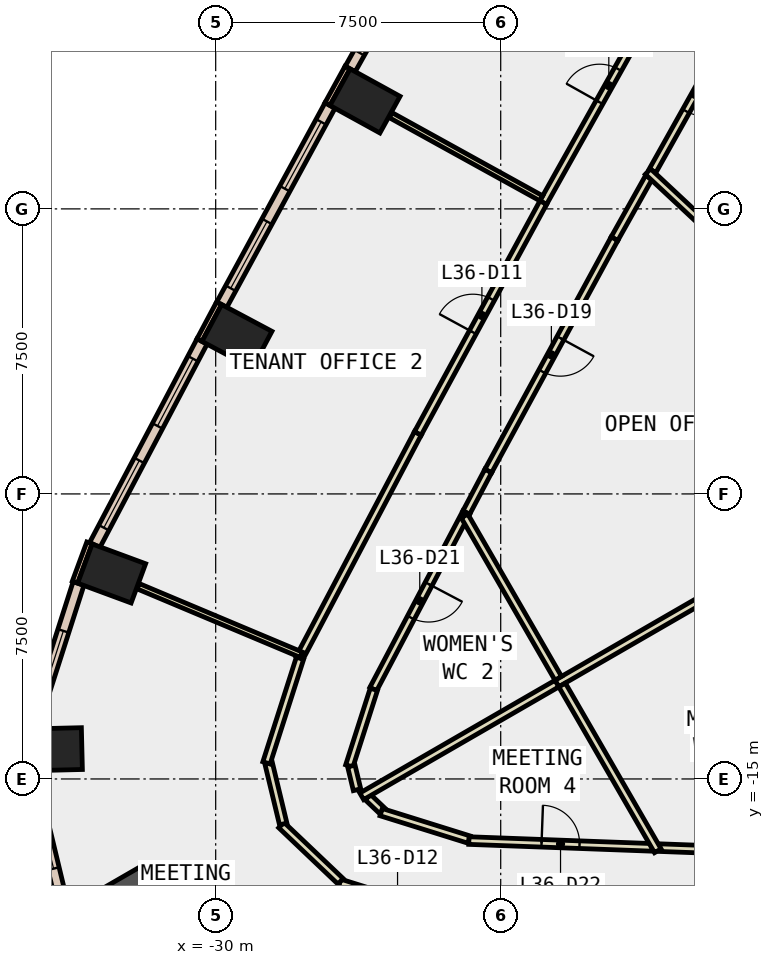
"""IFC4 building model, lengths in metres.
Left out: names, types, materials, properties, quantities, classifications, styles, units other than length and angle.
Written with IfcOpenShell. Run it as: python <this file> out.ifc"""

import sys

from ifc_helpers import new_model, si_unit, direction, frame, frame_2d, origin, origin_2d, place, context, subcontext, project, spatial, rectangle, extrude, element, fill, save


model = new_model("IFC4")
c1 = context("Model", 3, precision=1e-05, world=origin(), true_north=direction((0.0, 1.0)))
c2 = subcontext(c1, "Body", "Model", "MODEL_VIEW")
j1 = project(units=[si_unit("LENGTHUNIT", "METRE"), si_unit("PLANEANGLEUNIT", "RADIAN")], contexts=[c1])
p1 = place(None, origin())
s1 = spatial("IfcSite", under=j1, at=p1, CompositionType="ELEMENT")
p2 = place(p1, origin())
s2 = spatial("IfcBuilding", under=s1, at=p2, CompositionType="ELEMENT")
p3 = place(p2, frame((0.0, 0.0, 163.4)))
s3 = spatial("IfcBuildingStorey", under=s2, at=p3, CompositionType="ELEMENT", Elevation=163.4)
for number, where, z_axis, x_axis in (
    (1, (-26.071, 2.841, -0.4), (0.0, 0.0, 1.0), (0.482, 0.876, 0.0)),
    (2, (-29.44, -3.355, -0.4), (0.0, 0.0, 1.0), (0.47, 0.883, 0.0)),
    (3, (-32.738, -9.593, -0.4), (0.0, 0.0, 1.0), (0.347, 0.938, 0.0)),
    (4, (-34.271, -14.219, -0.4), (0.0, 0.0, 1.0), (-0.024, 1.0, 0.0)),
):
    element("IfcColumn", number, at=place(p3, frame(where, z_axis=z_axis, x_axis=x_axis)), inside=s3, PredefinedType="COLUMN", context=c2, shape_type="SweptSolid", body=[
        extrude(rectangle(XDim=1.1, YDim=1.5, at=origin_2d()), origin(), (0.0, 0.0, 1.0), 4.2),
    ])
p4 = place(p3, frame((-32.244, -18.615, -0.4), z_axis=(0.0, 0.0, 1.0), x_axis=(0.866025403784, 0.5, 0.0)))
e5 = element("IfcColumn", 5, at=p4, inside=s3, PredefinedType="COLUMN", context=c2, shape_type="SweptSolid", body=[
    extrude(rectangle(XDim=2.0, YDim=2.0, at=origin_2d()), origin(), (0.0, 0.0, 1.0), 4.2),
])
for number, where, z_axis, x_axis in (
    (6, (-26.529, 3.721, 0.0), (0.0, 0.0, 1.0), (-0.482, -0.876, 0.0)),
    (7, (-29.909, -2.482, 0.0), (0.0, 0.0, 1.0), (-0.47, -0.883, 0.0)),
    (8, (-33.321, -8.791, 0.0), (0.0, 0.0, 1.0), (-0.346, -0.938, 0.0)),
):
    element("IfcWall", number, at=place(p3, frame(where, z_axis=z_axis, x_axis=x_axis)), inside=s3, PredefinedType="STANDARD", context=c2, shape_type="SweptSolid", body=[
        extrude(rectangle(XDim=1.1, YDim=0.15, at=frame_2d((0.55, 0.0))), origin(), (0.0, 0.0, 1.0), 3.8),
    ])
p5 = place(p3, frame((-23.544, 8.883, 0.0), z_axis=(0.0, 0.0, 1.0), x_axis=(-0.489032196971, -0.87226573378, 0.0)))
e9 = element("IfcWall", 9, at=p5, inside=s3, PredefinedType="STANDARD", context=c2, shape_type="SweptSolid", body=[
    extrude(rectangle(XDim=5.963, YDim=0.3, at=frame_2d((2.981, 0.0))), origin(), (0.0, 0.0, 1.0), 3.8),
])
p6 = place(p5, frame((0.491, 0.0, 0.9)))
e10 = element("IfcOpeningElement", 10, at=p6, cuts=e9, PredefinedType="OPENING", context=c2, shape_type="SweptSolid", body=[
    extrude(rectangle(XDim=2.0, YDim=2.6, at=frame_2d((1.0, 1.3))), frame((0.0, 0.16, 0.0), z_axis=(0.0, -1.0, 0.0), x_axis=(1.0, 0.0, 0.0)), (0.0, 0.0, 1.0), 0.32),
])
p7 = place(p5, frame((3.472, 0.0, 0.9)))
e11 = element("IfcOpeningElement", 11, at=p7, cuts=e9, PredefinedType="OPENING", context=c2, shape_type="SweptSolid", body=[
    extrude(rectangle(XDim=2.0, YDim=2.6, at=frame_2d((1.0, 1.3))), frame((0.0, 0.16, 0.0), z_axis=(0.0, -1.0, 0.0), x_axis=(1.0, 0.0, 0.0)), (0.0, 0.0, 1.0), 0.32),
])
p8 = place(p3, frame((-26.991, 2.72, 0.0), z_axis=(0.0, 0.0, 1.0), x_axis=(-0.477555226268, -0.878601733361, 0.0)))
e12 = element("IfcWall", 12, at=p8, inside=s3, PredefinedType="STANDARD", context=c2, shape_type="SweptSolid", body=[
    extrude(rectangle(XDim=5.964, YDim=0.3, at=frame_2d((2.982, 0.0))), origin(), (0.0, 0.0, 1.0), 3.8),
])
p9 = place(p8, frame((0.491, 0.0, 0.9)))
e13 = element("IfcOpeningElement", 13, at=p9, cuts=e12, PredefinedType="OPENING", context=c2, shape_type="SweptSolid", body=[
    extrude(rectangle(XDim=2.0, YDim=2.6, at=frame_2d((1.0, 1.3))), frame((0.0, 0.16, 0.0), z_axis=(0.0, -1.0, 0.0), x_axis=(1.0, 0.0, 0.0)), (0.0, 0.0, 1.0), 0.32),
])
p10 = place(p8, frame((3.473, 0.0, 0.9)))
e14 = element("IfcOpeningElement", 14, at=p10, cuts=e12, PredefinedType="OPENING", context=c2, shape_type="SweptSolid", body=[
    extrude(rectangle(XDim=2.0, YDim=2.6, at=frame_2d((1.0, 1.3))), frame((0.0, 0.16, 0.0), z_axis=(0.0, -1.0, 0.0), x_axis=(1.0, 0.0, 0.0)), (0.0, 0.0, 1.0), 0.32),
])
p11 = place(p3, frame((-30.358, -3.488, 0.0), z_axis=(0.0, 0.0, 1.0), x_axis=(-0.466399410196, -0.884574242316, 0.0)))
e15 = element("IfcWall", 15, at=p11, inside=s3, PredefinedType="STANDARD", context=c2, shape_type="SweptSolid", body=[
    extrude(rectangle(XDim=6.055, YDim=0.3, at=frame_2d((3.027, 0.0))), origin(), (0.0, 0.0, 1.0), 3.8),
])
p12 = place(p11, frame((0.514, 0.0, 0.9)))
e16 = element("IfcOpeningElement", 16, at=p12, cuts=e15, PredefinedType="OPENING", context=c2, shape_type="SweptSolid", body=[
    extrude(rectangle(XDim=2.0, YDim=2.6, at=frame_2d((1.0, 1.3))), frame((0.0, 0.16, 0.0), z_axis=(0.0, -1.0, 0.0), x_axis=(1.0, 0.0, 0.0)), (0.0, 0.0, 1.0), 0.32),
])
p13 = place(p11, frame((3.541, 0.0, 0.9)))
e17 = element("IfcOpeningElement", 17, at=p13, cuts=e15, PredefinedType="OPENING", context=c2, shape_type="SweptSolid", body=[
    extrude(rectangle(XDim=2.0, YDim=2.6, at=frame_2d((1.0, 1.3))), frame((0.0, 0.16, 0.0), z_axis=(0.0, -1.0, 0.0), x_axis=(1.0, 0.0, 0.0)), (0.0, 0.0, 1.0), 0.32),
])
p14 = place(p3, frame((-33.609, -9.856, 0.0), z_axis=(0.0, 0.0, 1.0), x_axis=(-0.305018133869, -0.952346543025, 0.0)))
e18 = element("IfcWall", 18, at=p14, inside=s3, PredefinedType="STANDARD", context=c2, shape_type="SweptSolid", body=[
    extrude(rectangle(XDim=4.02, YDim=0.3, at=frame_2d((2.01, 0.0))), origin(), (0.0, 0.0, 1.0), 3.8),
])
p15 = place(p14, frame((1.31, 0.0, 0.9)))
e19 = element("IfcOpeningElement", 19, at=p15, cuts=e18, PredefinedType="OPENING", context=c2, shape_type="SweptSolid", body=[
    extrude(rectangle(XDim=1.4, YDim=2.6, at=frame_2d((0.7, 1.3))), frame((0.0, 0.16, 0.0), z_axis=(0.0, -1.0, 0.0), x_axis=(1.0, 0.0, 0.0)), (0.0, 0.0, 1.0), 0.32),
])
p16 = place(p3, frame((-34.886, -14.783, 0.0), z_axis=(0.0, 0.0, 1.0), x_axis=(0.234102046927, -0.972212030179, 0.0)))
e20 = element("IfcWall", 20, at=p16, inside=s3, PredefinedType="STANDARD", context=c2, shape_type="SweptSolid", body=[
    extrude(rectangle(XDim=3.9, YDim=0.3, at=frame_2d((1.95, 0.0))), origin(), (0.0, 0.0, 1.0), 3.8),
])
p17 = place(p16, frame((1.25, 0.0, 0.9)))
e21 = element("IfcOpeningElement", 21, at=p17, cuts=e20, PredefinedType="OPENING", context=c2, shape_type="SweptSolid", body=[
    extrude(rectangle(XDim=1.4, YDim=2.6, at=frame_2d((0.7, 1.3))), frame((0.0, 0.16, 0.0), z_axis=(0.0, -1.0, 0.0), x_axis=(1.0, 0.0, 0.0)), (0.0, 0.0, 1.0), 0.32),
])
p18 = place(p3, frame((-16.255, 5.014, 0.0), z_axis=(0.0, 0.0, 1.0), x_axis=(-0.488988017817, -0.87229050117, 0.0)))
e22 = element("IfcWall", 22, at=p18, inside=s3, PredefinedType="PARTITIONING", context=c2, shape_type="SweptSolid", body=[
    extrude(rectangle(XDim=4.599, YDim=0.2, at=frame_2d((2.3, 0.0))), origin(), (0.0, 0.0, 1.0), 3.8),
])
p19 = place(p18, frame((1.8, 0.0, 0.0)))
e23 = element("IfcOpeningElement", 23, at=p19, cuts=e22, PredefinedType="OPENING", context=c2, shape_type="SweptSolid", body=[
    extrude(rectangle(XDim=1.0, YDim=2.1, at=frame_2d((0.5, 1.05))), frame((0.0, 0.11, 0.0), z_axis=(0.0, -1.0, 0.0), x_axis=(1.0, 0.0, 0.0)), (0.0, 0.0, 1.0), 0.22),
])
p20 = place(p3, frame((-18.602, 0.828, 0.0), z_axis=(0.0, 0.0, 1.0), x_axis=(-0.488969229043, -0.872301033502, 0.0)))
e24 = element("IfcWall", 24, at=p20, inside=s3, PredefinedType="PARTITIONING", context=c2, shape_type="SweptSolid", body=[
    extrude(rectangle(XDim=1.849, YDim=0.2, at=frame_2d((0.924, 0.0))), origin(), (0.0, 0.0, 1.0), 3.8),
])
p21 = place(p3, frame((-19.506, -0.785, 0.0), z_axis=(0.0, 0.0, 1.0), x_axis=(-0.477513909405, -0.878624189472, 0.0)))
e25 = element("IfcWall", 25, at=p21, inside=s3, PredefinedType="PARTITIONING", context=c2, shape_type="SweptSolid", body=[
    extrude(rectangle(XDim=6.956, YDim=0.2, at=frame_2d((3.478, 0.0))), origin(), (0.0, 0.0, 1.0), 3.8),
])
p22 = place(p21, frame((2.978, 0.0, 0.0)))
e26 = element("IfcOpeningElement", 26, at=p22, cuts=e25, PredefinedType="OPENING", context=c2, shape_type="SweptSolid", body=[
    extrude(rectangle(XDim=1.0, YDim=2.1, at=frame_2d((0.5, 1.05))), frame((0.0, 0.11, 0.0), z_axis=(0.0, -1.0, 0.0), x_axis=(1.0, 0.0, 0.0)), (0.0, 0.0, 1.0), 0.22),
])
p23 = place(p3, frame((-22.828, -6.897, 0.0), z_axis=(0.0, 0.0, 1.0), x_axis=(-0.467225806893, -0.884138023938, 0.0)))
e27 = element("IfcWall", 27, at=p23, inside=s3, PredefinedType="PARTITIONING", context=c2, shape_type="SweptSolid", body=[
    extrude(rectangle(XDim=1.237, YDim=0.2, at=frame_2d((0.619, 0.0))), origin(), (0.0, 0.0, 1.0), 3.8),
])
p24 = place(p3, frame((-18.316, -16.807, 0.0), z_axis=(0.0, 0.0, 1.0), x_axis=(0.999315981353, -0.036980662692, 0.0)))
e28 = element("IfcWall", 28, at=p24, inside=s3, PredefinedType="PARTITIONING", context=c2, shape_type="SweptSolid", body=[
    extrude(rectangle(XDim=2.331, YDim=0.2, at=frame_2d((1.165, 0.0))), origin(), (0.0, 0.0, 1.0), 3.8),
])
p25 = place(p3, frame((-23.406, -7.991, 0.0), z_axis=(0.0, 0.0, 1.0), x_axis=(-0.466307932558, -0.884622468646, 0.0)))
e29 = element("IfcWall", 29, at=p25, inside=s3, PredefinedType="PARTITIONING", context=c2, shape_type="SweptSolid", body=[
    extrude(rectangle(XDim=5.25, YDim=0.2, at=frame_2d((2.625, 0.0))), origin(), (0.0, 0.0, 1.0), 3.8),
])
p26 = place(p25, frame((2.125, 0.0, 0.0)))
e30 = element("IfcOpeningElement", 30, at=p26, cuts=e29, PredefinedType="OPENING", context=c2, shape_type="SweptSolid", body=[
    extrude(rectangle(XDim=1.0, YDim=2.1, at=frame_2d((0.5, 1.05))), frame((0.0, 0.11, 0.0), z_axis=(0.0, -1.0, 0.0), x_axis=(1.0, 0.0, 0.0)), (0.0, 0.0, 1.0), 0.22),
])
p27 = place(p3, frame((-25.838, -12.642, 0.0), z_axis=(0.0, 0.0, 1.0), x_axis=(-0.305169069368, -0.952298188122, 0.0)))
e31 = element("IfcWall", 31, at=p27, inside=s3, PredefinedType="PARTITIONING", context=c2, shape_type="SweptSolid", body=[
    extrude(rectangle(XDim=2.117, YDim=0.2, at=frame_2d((1.059, 0.0))), origin(), (0.0, 0.0, 1.0), 3.8),
])
p28 = place(p3, frame((-26.43, -14.66, 0.0), z_axis=(0.0, 0.0, 1.0), x_axis=(0.233574377125, -0.972338938, 0.0)))
e32 = element("IfcWall", 32, at=p28, inside=s3, PredefinedType="PARTITIONING", context=c2, shape_type="SweptSolid", body=[
    extrude(rectangle(XDim=0.642, YDim=0.2, at=frame_2d((0.321, 0.0))), origin(), (0.0, 0.0, 1.0), 3.8),
])
p29 = place(p3, frame((-25.998, -15.476, 0.0), z_axis=(0.0, 0.0, 1.0), x_axis=(0.724294499657, -0.689490737985, 0.0)))
e33 = element("IfcWall", 33, at=p29, inside=s3, PredefinedType="PARTITIONING", context=c2, shape_type="SweptSolid", body=[
    extrude(rectangle(XDim=0.519, YDim=0.2, at=frame_2d((0.26, 0.0))), origin(), (0.0, 0.0, 1.0), 3.8),
])
p30 = place(p3, frame((-25.645, -15.873, 0.0), z_axis=(0.0, 0.0, 1.0), x_axis=(0.95454810771, -0.298056890655, 0.0)))
e34 = element("IfcWall", 34, at=p30, inside=s3, PredefinedType="PARTITIONING", context=c2, shape_type="SweptSolid", body=[
    extrude(rectangle(XDim=2.422, YDim=0.2, at=frame_2d((1.211, 0.0))), origin(), (0.0, 0.0, 1.0), 3.8),
])
p31 = place(p3, frame((-23.337, -16.621, 0.0), z_axis=(0.0, 0.0, 1.0), x_axis=(0.999311710526, -0.037095892019, 0.0)))
e35 = element("IfcWall", 35, at=p31, inside=s3, PredefinedType="PARTITIONING", context=c2, shape_type="SweptSolid", body=[
    extrude(rectangle(XDim=4.824, YDim=0.2, at=frame_2d((2.412, 0.0))), origin(), (0.0, 0.0, 1.0), 3.8),
])
p32 = place(p31, frame((1.913, 0.0, 0.0)))
e36 = element("IfcOpeningElement", 36, at=p32, cuts=e35, PredefinedType="OPENING", context=c2, shape_type="SweptSolid", body=[
    extrude(rectangle(XDim=1.0, YDim=2.1, at=frame_2d((0.5, 1.05))), frame((0.0, 0.11, 0.0), z_axis=(0.0, -1.0, 0.0), x_axis=(1.0, 0.0, 0.0)), (0.0, 0.0, 1.0), 0.22),
])
p33 = place(p3, frame((-21.381, 0.165, 0.0), z_axis=(0.0, 0.0, 1.0), x_axis=(0.489014139272, 0.872275857509, 0.0)))
e37 = element("IfcWall", 37, at=p33, inside=s3, PredefinedType="PARTITIONING", context=c2, shape_type="SweptSolid", body=[
    extrude(rectangle(XDim=7.057, YDim=0.2, at=frame_2d((3.529, 0.0))), origin(), (0.0, 0.0, 1.0), 3.8),
])
p34 = place(p33, frame((3.029, 0.0, 0.0)))
e38 = element("IfcOpeningElement", 38, at=p34, cuts=e37, PredefinedType="OPENING", context=c2, shape_type="SweptSolid", body=[
    extrude(rectangle(XDim=1.0, YDim=2.1, at=frame_2d((0.5, 1.05))), frame((0.0, 0.11, 0.0), z_axis=(0.0, -1.0, 0.0), x_axis=(1.0, 0.0, 0.0)), (0.0, 0.0, 1.0), 0.22),
])
p35 = place(p3, frame((-27.798, -11.819, 0.0), z_axis=(0.0, 0.0, 1.0), x_axis=(0.466450727507, 0.884547182918, 0.0)))
e39 = element("IfcWall", 39, at=p35, inside=s3, PredefinedType="PARTITIONING", context=c2, shape_type="SweptSolid", body=[
    extrude(rectangle(XDim=6.685, YDim=0.2, at=frame_2d((3.342, 0.0))), origin(), (0.0, 0.0, 1.0), 3.8),
])
p36 = place(p3, frame((-24.68, -5.906, 0.0), z_axis=(0.0, 0.0, 1.0), x_axis=(0.47757676389, 0.878590026459, 0.0)))
e40 = element("IfcWall", 40, at=p36, inside=s3, PredefinedType="PARTITIONING", context=c2, shape_type="SweptSolid", body=[
    extrude(rectangle(XDim=6.91, YDim=0.2, at=frame_2d((3.455, 0.0))), origin(), (0.0, 0.0, 1.0), 3.8),
])
p37 = place(p36, frame((3.029, 0.0, 0.0)))
e41 = element("IfcOpeningElement", 41, at=p37, cuts=e40, PredefinedType="OPENING", context=c2, shape_type="SweptSolid", body=[
    extrude(rectangle(XDim=1.0, YDim=2.1, at=frame_2d((0.5, 1.05))), frame((0.0, 0.11, 0.0), z_axis=(0.0, -1.0, 0.0), x_axis=(1.0, 0.0, 0.0)), (0.0, 0.0, 1.0), 0.22),
])
p38 = place(p3, frame((-23.691, -18.683, 0.0), z_axis=(0.0, 0.0, 1.0), x_axis=(-0.954546657381, 0.298061535398, 0.0)))
e42 = element("IfcWall", 42, at=p38, inside=s3, PredefinedType="PARTITIONING", context=c2, shape_type="SweptSolid", body=[
    extrude(rectangle(XDim=3.191, YDim=0.2, at=frame_2d((1.596, 0.0))), origin(), (0.0, 0.0, 1.0), 3.8),
])
p39 = place(p38, frame((1.096, 0.0, 0.0)))
e43 = element("IfcOpeningElement", 43, at=p39, cuts=e42, PredefinedType="OPENING", context=c2, shape_type="SweptSolid", body=[
    extrude(rectangle(XDim=1.0, YDim=2.1, at=frame_2d((0.5, 1.05))), frame((0.0, 0.11, 0.0), z_axis=(0.0, -1.0, 0.0), x_axis=(1.0, 0.0, 0.0)), (0.0, 0.0, 1.0), 0.22),
])
p40 = place(p3, frame((-26.714, -17.693, 0.0), z_axis=(0.0, 0.0, 1.0), x_axis=(-0.724712974479, 0.689050872303, 0.0)))
e44 = element("IfcWall", 44, at=p40, inside=s3, PredefinedType="PARTITIONING", context=c2, shape_type="SweptSolid", body=[
    extrude(rectangle(XDim=2.15, YDim=0.2, at=frame_2d((1.075, 0.0))), origin(), (0.0, 0.0, 1.0), 3.8),
])
p41 = place(p3, frame((-28.223, -16.184, 0.0), z_axis=(0.0, 0.0, 1.0), x_axis=(-0.233826017197, 0.972278454807, 0.0)))
e45 = element("IfcWall", 45, at=p41, inside=s3, PredefinedType="PARTITIONING", context=c2, shape_type="SweptSolid", body=[
    extrude(rectangle(XDim=1.651, YDim=0.2, at=frame_2d((0.825, 0.0))), origin(), (0.0, 0.0, 1.0), 3.8),
])
p42 = place(p3, frame((-28.663, -14.577, 0.0), z_axis=(0.0, 0.0, 1.0), x_axis=(0.304925942137, 0.952376065329, 0.0)))
e46 = element("IfcWall", 46, at=p42, inside=s3, PredefinedType="PARTITIONING", context=c2, shape_type="SweptSolid", body=[
    extrude(rectangle(XDim=2.89, YDim=0.2, at=frame_2d((1.445, 0.0))), origin(), (0.0, 0.0, 1.0), 3.8),
])
p43 = place(p3, frame((-11.372, -5.79, 0.0), z_axis=(0.0, 0.0, 1.0), x_axis=(-0.730922728623, 0.682460229451, 0.0)))
e47 = element("IfcWall", 47, at=p43, inside=s3, PredefinedType="PARTITIONING", context=c2, shape_type="SweptSolid", body=[
    extrude(rectangle(XDim=9.924, YDim=0.2, at=frame_2d((4.962, 0.0))), origin(), (0.0, 0.0, 1.0), 3.8),
])
p44 = place(p3, frame((-16.952, -10.138, 0.0), z_axis=(0.0, 0.0, 1.0), x_axis=(-0.866054992606, -0.499948747156, 0.0)))
e48 = element("IfcWall", 48, at=p44, inside=s3, PredefinedType="PARTITIONING", context=c2, shape_type="SweptSolid", body=[
    extrude(rectangle(XDim=4.701, YDim=0.2, at=frame_2d((2.35, 0.0))), origin(), (0.0, 0.0, 1.0), 3.8),
])
p45 = place(p3, frame((-20.986, -12.351, 0.0), z_axis=(0.0, 0.0, 1.0), x_axis=(-0.499993851206, 0.866028953763, 0.0)))
e49 = element("IfcWall", 49, at=p45, inside=s3, PredefinedType="PARTITIONING", context=c2, shape_type="SweptSolid", body=[
    extrude(rectangle(XDim=4.932, YDim=0.2, at=frame_2d((2.466, 0.0))), origin(), (0.0, 0.0, 1.0), 3.8),
])
p46 = place(p3, frame((-18.366, -16.89, 0.0), z_axis=(0.0, 0.0, 1.0), x_axis=(-0.499965828395, 0.866045131871, 0.0)))
e50 = element("IfcWall", 50, at=p46, inside=s3, PredefinedType="PARTITIONING", context=c2, shape_type="SweptSolid", body=[
    extrude(rectangle(XDim=5.036, YDim=0.2, at=frame_2d((2.518, 0.0))), origin(), (0.0, 0.0, 1.0), 3.8),
])
p47 = place(p3, frame((-21.021, -12.491, 0.0), z_axis=(0.0, 0.0, 1.0), x_axis=(-0.865966890845, -0.500101333692, 0.0)))
e51 = element("IfcWall", 51, at=p47, inside=s3, PredefinedType="PARTITIONING", context=c2, shape_type="SweptSolid", body=[
    extrude(rectangle(XDim=5.931, YDim=0.2, at=frame_2d((2.965, 0.0))), origin(), (0.0, 0.0, 1.0), 3.8),
])
p48 = place(p3, frame((-21.432, 0.278, 0.0), z_axis=(0.0, 0.0, 1.0), x_axis=(-0.875412579047, 0.483376474857, 0.0)))
e52 = element("IfcWall", 52, at=p48, inside=s3, PredefinedType="PARTITIONING", context=c2, shape_type="SweptSolid", body=[
    extrude(rectangle(XDim=4.531, YDim=0.15, at=frame_2d((2.265, 0.0))), origin(), (0.0, 0.0, 1.0), 3.8),
])
p49 = place(p3, frame((-27.751, -11.73, 0.0), z_axis=(0.0, 0.0, 1.0), x_axis=(-0.92196786851, 0.387266380462, 0.0)))
e53 = element("IfcWall", 53, at=p49, inside=s3, PredefinedType="PARTITIONING", context=c2, shape_type="SweptSolid", body=[
    extrude(rectangle(XDim=4.653, YDim=0.15, at=frame_2d((2.327, 0.0))), origin(), (0.0, 0.0, 1.0), 3.8),
])
p50 = place(p7, origin())
e54 = element("IfcWindow", 54, at=p50, inside=s3, PartitioningType="SINGLE_PANEL", PredefinedType="WINDOW", context=c2, shape_type="SweptSolid", body=[
    extrude(rectangle(XDim=2.0, YDim=2.6, at=frame_2d((1.0, 1.3))), frame((0.0, 0.03, 0.0), z_axis=(0.0, -1.0, 0.0), x_axis=(1.0, 0.0, 0.0)), (0.0, 0.0, 1.0), 0.06),
])
fill(e11, e54)
p51 = place(p9, origin())
e55 = element("IfcWindow", 55, at=p51, inside=s3, PartitioningType="SINGLE_PANEL", PredefinedType="WINDOW", context=c2, shape_type="SweptSolid", body=[
    extrude(rectangle(XDim=2.0, YDim=2.6, at=frame_2d((1.0, 1.3))), frame((0.0, 0.03, 0.0), z_axis=(0.0, -1.0, 0.0), x_axis=(1.0, 0.0, 0.0)), (0.0, 0.0, 1.0), 0.06),
])
fill(e13, e55)
p52 = place(p10, origin())
e56 = element("IfcWindow", 56, at=p52, inside=s3, PartitioningType="SINGLE_PANEL", PredefinedType="WINDOW", context=c2, shape_type="SweptSolid", body=[
    extrude(rectangle(XDim=2.0, YDim=2.6, at=frame_2d((1.0, 1.3))), frame((0.0, 0.03, 0.0), z_axis=(0.0, -1.0, 0.0), x_axis=(1.0, 0.0, 0.0)), (0.0, 0.0, 1.0), 0.06),
])
fill(e14, e56)
p53 = place(p12, origin())
e57 = element("IfcWindow", 57, at=p53, inside=s3, PartitioningType="SINGLE_PANEL", PredefinedType="WINDOW", context=c2, shape_type="SweptSolid", body=[
    extrude(rectangle(XDim=2.0, YDim=2.6, at=frame_2d((1.0, 1.3))), frame((0.0, 0.03, 0.0), z_axis=(0.0, -1.0, 0.0), x_axis=(1.0, 0.0, 0.0)), (0.0, 0.0, 1.0), 0.06),
])
fill(e16, e57)
p54 = place(p13, origin())
e58 = element("IfcWindow", 58, at=p54, inside=s3, PartitioningType="SINGLE_PANEL", PredefinedType="WINDOW", context=c2, shape_type="SweptSolid", body=[
    extrude(rectangle(XDim=2.0, YDim=2.6, at=frame_2d((1.0, 1.3))), frame((0.0, 0.03, 0.0), z_axis=(0.0, -1.0, 0.0), x_axis=(1.0, 0.0, 0.0)), (0.0, 0.0, 1.0), 0.06),
])
fill(e17, e58)
p55 = place(p15, origin())
e59 = element("IfcWindow", 59, at=p55, inside=s3, PartitioningType="SINGLE_PANEL", PredefinedType="WINDOW", context=c2, shape_type="SweptSolid", body=[
    extrude(rectangle(XDim=1.4, YDim=2.6, at=frame_2d((0.7, 1.3))), frame((0.0, 0.03, 0.0), z_axis=(0.0, -1.0, 0.0), x_axis=(1.0, 0.0, 0.0)), (0.0, 0.0, 1.0), 0.06),
])
fill(e19, e59)
p56 = place(p17, origin())
e60 = element("IfcWindow", 60, at=p56, inside=s3, PartitioningType="SINGLE_PANEL", PredefinedType="WINDOW", context=c2, shape_type="SweptSolid", body=[
    extrude(rectangle(XDim=1.4, YDim=2.6, at=frame_2d((0.7, 1.3))), frame((0.0, 0.03, 0.0), z_axis=(0.0, -1.0, 0.0), x_axis=(1.0, 0.0, 0.0)), (0.0, 0.0, 1.0), 0.06),
])
fill(e21, e60)
p57 = place(p34, origin())
e61 = element("IfcDoor", 61, at=p57, inside=s3, OperationType="SINGLE_SWING_RIGHT", PredefinedType="DOOR", context=c2, shape_type="SweptSolid", body=[
    extrude(rectangle(XDim=1.0, YDim=2.1, at=frame_2d((0.5, 1.05))), frame((0.0, 0.025, 0.0), z_axis=(0.0, -1.0, 0.0), x_axis=(1.0, 0.0, 0.0)), (0.0, 0.0, 1.0), 0.05),
])
fill(e38, e61)
p58 = place(p37, origin())
e62 = element("IfcDoor", 62, at=p58, inside=s3, OperationType="SINGLE_SWING_LEFT", PredefinedType="DOOR", context=c2, shape_type="SweptSolid", body=[
    extrude(rectangle(XDim=1.0, YDim=2.1, at=frame_2d((0.5, 1.05))), frame((0.0, 0.025, 0.0), z_axis=(0.0, -1.0, 0.0), x_axis=(1.0, 0.0, 0.0)), (0.0, 0.0, 1.0), 0.05),
])
fill(e41, e62)
p59 = place(p19, origin())
e63 = element("IfcDoor", 63, at=p59, inside=s3, OperationType="SINGLE_SWING_LEFT", PredefinedType="DOOR", context=c2, shape_type="SweptSolid", body=[
    extrude(rectangle(XDim=1.0, YDim=2.1, at=frame_2d((0.5, 1.05))), frame((0.0, 0.025, 0.0), z_axis=(0.0, -1.0, 0.0), x_axis=(1.0, 0.0, 0.0)), (0.0, 0.0, 1.0), 0.05),
])
fill(e23, e63)
p60 = place(p22, origin())
e64 = element("IfcDoor", 64, at=p60, inside=s3, OperationType="SINGLE_SWING_LEFT", PredefinedType="DOOR", context=c2, shape_type="SweptSolid", body=[
    extrude(rectangle(XDim=1.0, YDim=2.1, at=frame_2d((0.5, 1.05))), frame((0.0, 0.025, 0.0), z_axis=(0.0, -1.0, 0.0), x_axis=(1.0, 0.0, 0.0)), (0.0, 0.0, 1.0), 0.05),
])
fill(e26, e64)
p61 = place(p26, origin())
e65 = element("IfcDoor", 65, at=p61, inside=s3, OperationType="SINGLE_SWING_LEFT", PredefinedType="DOOR", context=c2, shape_type="SweptSolid", body=[
    extrude(rectangle(XDim=1.0, YDim=2.1, at=frame_2d((0.5, 1.05))), frame((0.0, 0.025, 0.0), z_axis=(0.0, -1.0, 0.0), x_axis=(1.0, 0.0, 0.0)), (0.0, 0.0, 1.0), 0.05),
])
fill(e30, e65)
p62 = place(p32, origin())
e66 = element("IfcDoor", 66, at=p62, inside=s3, OperationType="SINGLE_SWING_LEFT", PredefinedType="DOOR", context=c2, shape_type="SweptSolid", body=[
    extrude(rectangle(XDim=1.0, YDim=2.1, at=frame_2d((0.5, 1.05))), frame((0.0, 0.025, 0.0), z_axis=(0.0, -1.0, 0.0), x_axis=(1.0, 0.0, 0.0)), (0.0, 0.0, 1.0), 0.05),
])
fill(e36, e66)
save(model, sys.argv[1])
